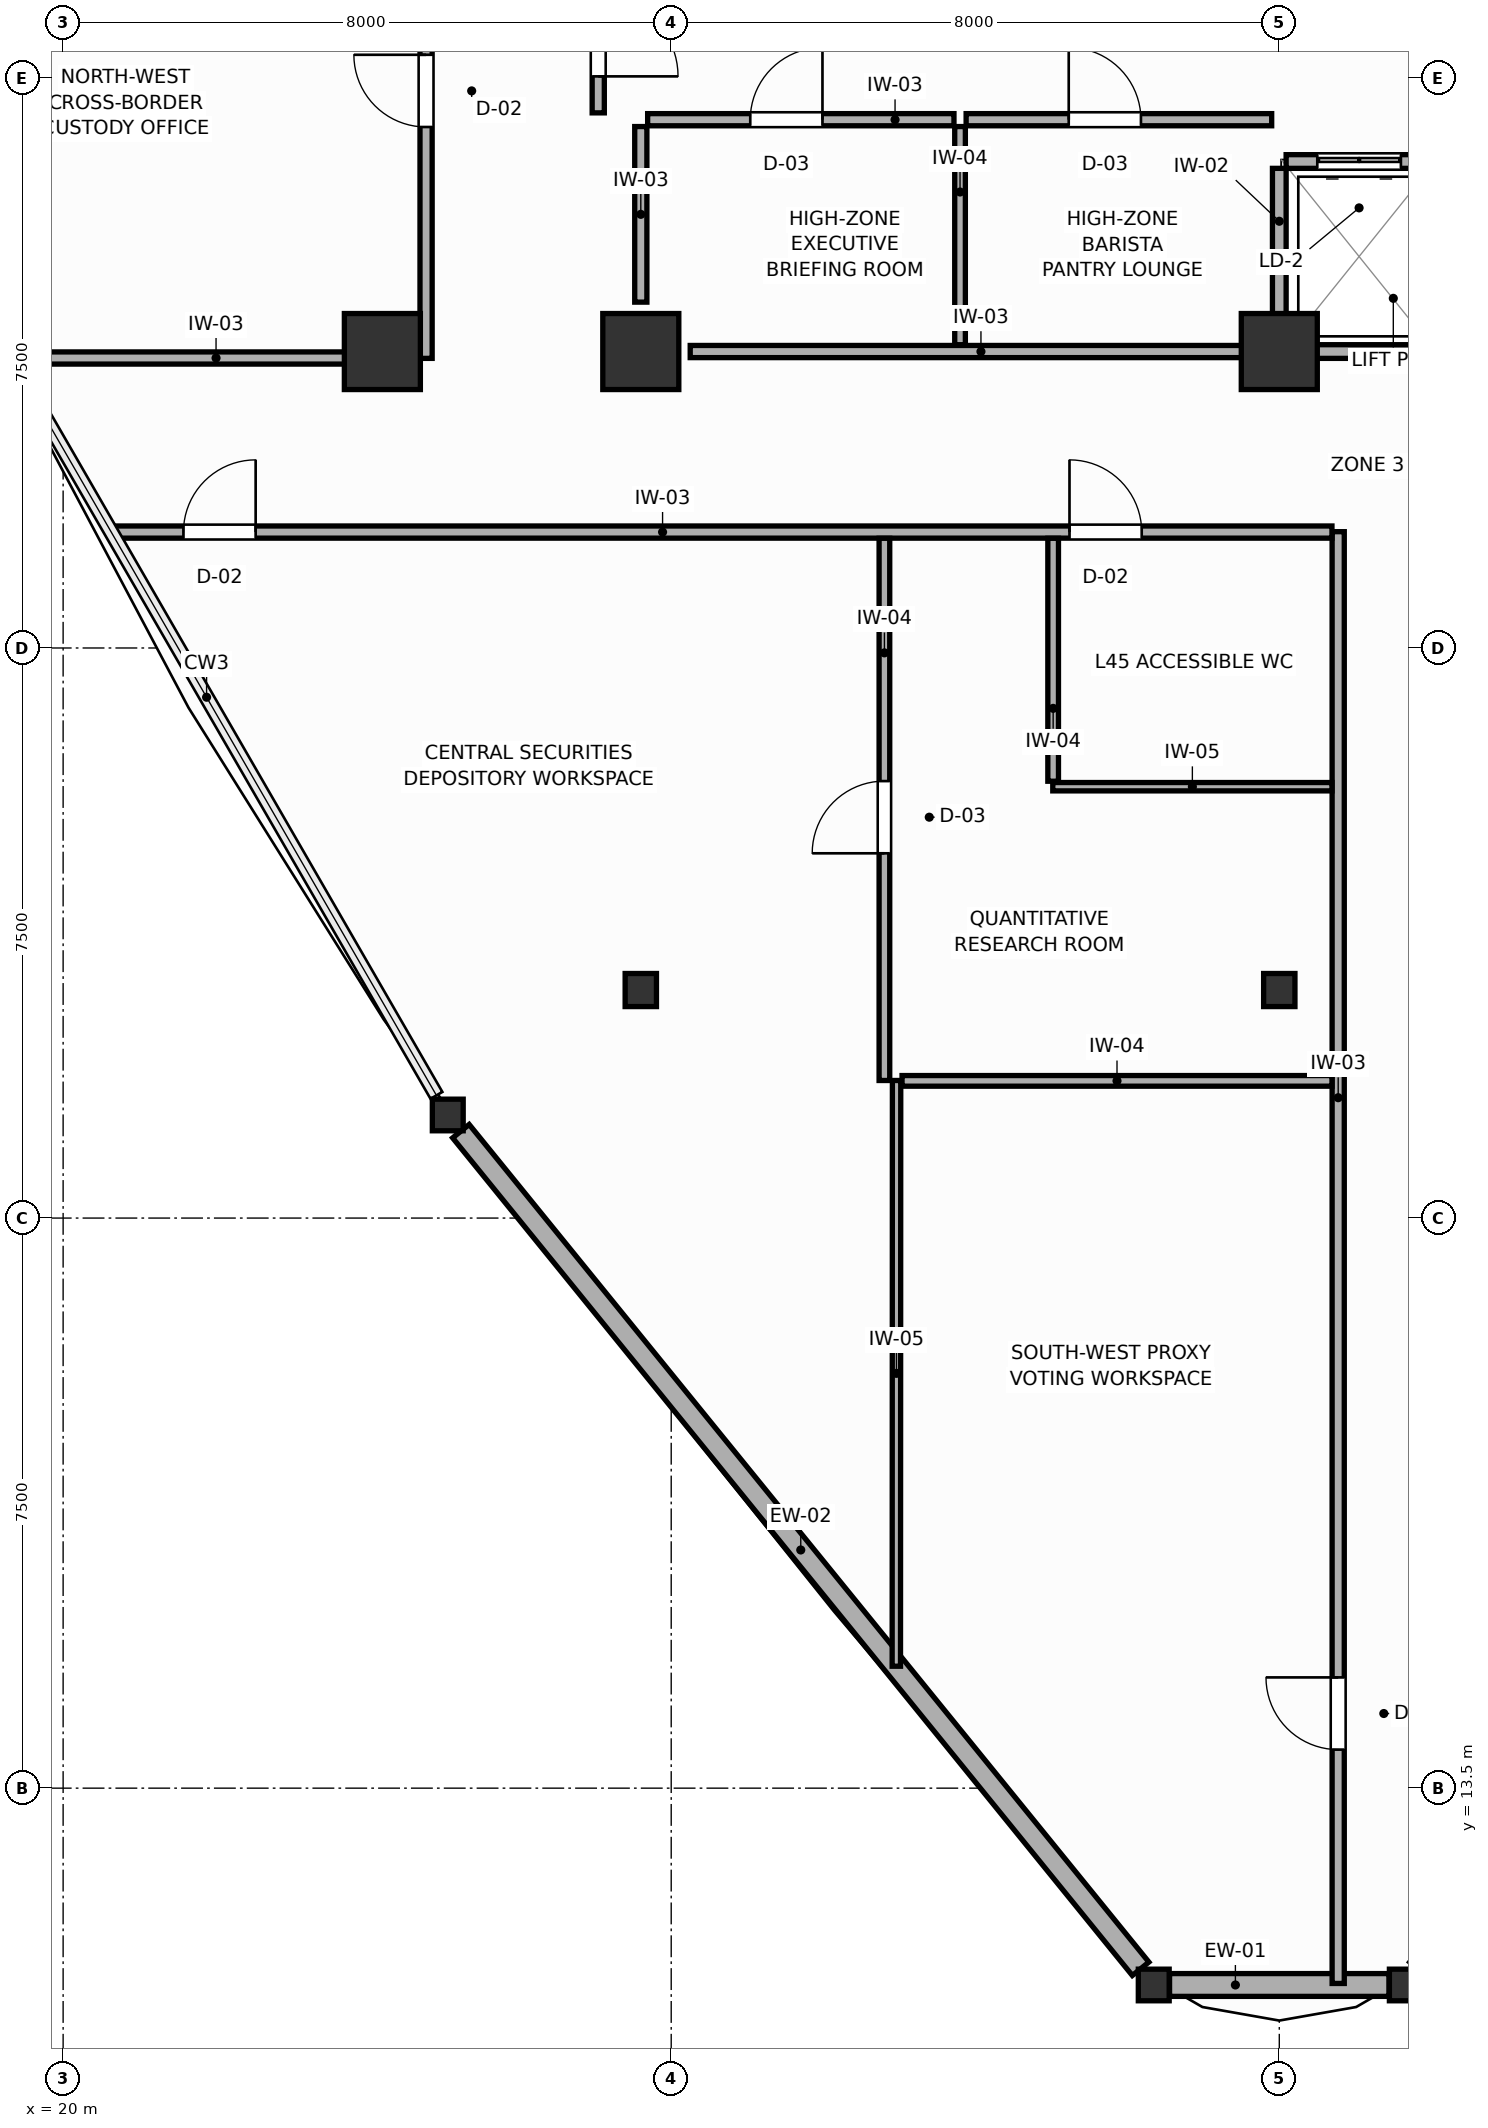
"""IFC4 building model, lengths in metres.
Left out: names, types, materials, properties, quantities, classifications, styles, units other than length and angle.
Written with IfcOpenShell. Run it as: python <this file> out.ifc"""

import sys

from ifc_helpers import new_model, si_unit, direction, frame, frame_2d, origin, origin_2d, place, context, subcontext, project, spatial, rectangle, i_section, extrude, source, transform, mapped, element, fill, save


model = new_model("IFC4")
c1 = context("Model", 3, precision=1e-05, world=origin(), true_north=direction((0.0, 1.0)))
c2 = subcontext(c1, "Body", "Model", "MODEL_VIEW")
j1 = project(units=[si_unit("LENGTHUNIT", "METRE"), si_unit("PLANEANGLEUNIT", "RADIAN")], contexts=[c1])
p1 = place(None, origin())
s1 = spatial("IfcSite", under=j1, at=p1, CompositionType="ELEMENT")
p2 = place(p1, origin())
s2 = spatial("IfcBuilding", under=s1, at=p2, CompositionType="ELEMENT")
p3 = place(p2, frame((0.0, 0.0, 175.8)))
s3 = spatial("IfcBuildingStorey", under=s2, at=p3, CompositionType="ELEMENT", Elevation=175.8)
m1 = source(origin(), c2, "Body", "SweptSolid", [
    extrude(rectangle(XDim=1.0, YDim=1.0, at=origin_2d()), origin(), (0.0, 0.0, 1.0), 3.6),
])
for number, where, z_axis, x_axis in (
    (1, (27.6, 32.4, 0.0), (0.0, 0.0, 1.0), (1.0, 0.0, 0.0)),
    (2, (36.0, 32.4, 0.0), (0.0, 0.0, 1.0), (1.0, 0.0, 0.0)),
    (3, (24.2, 32.4, 0.0), (0.0, 0.0, 1.0), (1.0, 0.0, 0.0)),
):
    element("IfcColumn", number, at=place(p3, frame(where, z_axis=z_axis, x_axis=x_axis)), inside=s3, PredefinedType="COLUMN", context=c2, shape_type="MappedRepresentation", body=[
        mapped(m1, transform((0.0, 0.0, 0.0), scale=1.0)),
    ])
m2 = source(origin(), c2, "Body", "SweptSolid", [
    extrude(i_section(OverallWidth=0.412, OverallDepth=0.435, WebThickness=0.033, FlangeThickness=0.053, FilletRadius=0.015, at=origin_2d()), origin(), (0.0, 0.0, 1.0), 3.6),
])
for number, where, z_axis, x_axis in (
    (4, (27.6, 24.0, 0.0), (0.0, 0.0, 1.0), (1.0, 0.0, 0.0)),
    (5, (36.0, 24.0, 0.0), (0.0, 0.0, 1.0), (1.0, 0.0, 0.0)),
):
    element("IfcColumn", number, at=place(p3, frame(where, z_axis=z_axis, x_axis=x_axis)), inside=s3, PredefinedType="COLUMN", context=c2, shape_type="MappedRepresentation", body=[
        mapped(m2, transform((0.0, 0.0, 0.0), scale=1.0)),
    ])
m3 = source(origin(), c2, "Body", "SweptSolid", [
    extrude(i_section(OverallWidth=0.406, OverallDepth=0.416, WebThickness=0.027, FlangeThickness=0.044, FilletRadius=0.015, at=origin_2d()), origin(), (0.0, 0.0, 1.0), 3.6),
])
for number, where, z_axis, x_axis in (
    (6, (25.06, 22.356, 0.0), (0.0, 0.0, 1.0), (1.0, 0.0, 0.0)),
    (7, (34.348, 10.911, 0.0), (0.0, 0.0, 1.0), (1.0, 0.0, 0.0)),
    (8, (37.652, 10.911, 0.0), (0.0, 0.0, 1.0), (1.0, 0.0, 0.0)),
):
    element("IfcColumn", number, at=place(p3, frame(where, z_axis=z_axis, x_axis=x_axis)), inside=s3, PredefinedType="COLUMN", context=c2, shape_type="MappedRepresentation", body=[
        mapped(m3, transform((0.0, 0.0, 0.0), scale=1.0)),
    ])
p4 = place(p3, frame((25.233, 22.143, 0.0), z_axis=(0.0, 0.0, 1.0), x_axis=(0.63011778054, -0.776499570281, 0.0)))
e9 = element("IfcWall", 9, at=p4, inside=s3, PredefinedType="SOLIDWALL", context=c2, shape_type="SweptSolid", body=[
    extrude(rectangle(XDim=14.192, YDim=0.28, at=frame_2d((7.096, 0.0))), origin(), (0.0, 0.0, 1.0), 1.87),
])
p5 = place(p3, frame((34.556, 10.911, 0.0), z_axis=(0.0, 0.0, 1.0), x_axis=(1.0, 0.0, 0.0)))
e10 = element("IfcWall", 10, at=p5, inside=s3, PredefinedType="SOLIDWALL", context=c2, shape_type="SweptSolid", body=[
    extrude(rectangle(XDim=2.887, YDim=0.3, at=frame_2d((1.444, 0.0))), origin(), (0.0, 0.0, 1.0), 1.87),
])
p6 = place(p3, frame((36.09, 34.9, 0.0), z_axis=(0.0, 0.0, 1.0), x_axis=(1.0, 0.0, 0.0)))
e11 = element("IfcWall", 11, at=p6, inside=s3, PredefinedType="PARTITIONING", context=c2, shape_type="SweptSolid", body=[
    extrude(rectangle(XDim=1.92, YDim=0.18, at=frame_2d((0.96, 0.0))), origin(), (0.0, 0.0, 1.0), 3.4),
])
p7 = place(p6, frame((0.41, 0.0, 0.0)))
e12 = element("IfcOpeningElement", 12, at=p7, cuts=e11, PredefinedType="OPENING", context=c2, shape_type="SweptSolid", body=[
    extrude(rectangle(XDim=1.1, YDim=2.1, at=frame_2d((0.55, 1.05))), frame((0.0, 0.1, 0.0), z_axis=(0.0, -1.0, 0.0), x_axis=(1.0, 0.0, 0.0)), (0.0, 0.0, 1.0), 0.2),
])
p8 = place(p3, frame((36.09, 32.4, 0.0), z_axis=(0.0, 0.0, 1.0), x_axis=(1.0, 0.0, 0.0)))
e13 = element("IfcWall", 13, at=p8, inside=s3, PredefinedType="PARTITIONING", context=c2, shape_type="SweptSolid", body=[
    extrude(rectangle(XDim=1.92, YDim=0.18, at=frame_2d((0.96, 0.0))), origin(), (0.0, 0.0, 1.0), 2.16),
])
p9 = place(p3, frame((36.0, 32.49, 0.0), z_axis=(0.0, 0.0, 1.0), x_axis=(0.0, 1.0, 0.0)))
e14 = element("IfcWall", 14, at=p9, inside=s3, PredefinedType="PARTITIONING", context=c2, shape_type="SweptSolid", body=[
    extrude(rectangle(XDim=2.32, YDim=0.18, at=frame_2d((1.16, 0.0))), origin(), (0.0, 0.0, 1.0), 3.4),
])
p10 = place(p3, frame((28.25, 32.4, 0.0), z_axis=(0.0, 0.0, 1.0), x_axis=(1.0, 0.0, 0.0)))
e15 = element("IfcWall", 15, at=p10, inside=s3, PredefinedType="PARTITIONING", context=c2, shape_type="SweptSolid", body=[
    extrude(rectangle(XDim=7.65, YDim=0.16, at=frame_2d((3.825, 0.0))), origin(), (0.0, 0.0, 1.0), 2.16),
])
p11 = place(p3, frame((27.6, 33.05, 0.0), z_axis=(0.0, 0.0, 1.0), x_axis=(0.0, 1.0, 0.0)))
e16 = element("IfcWall", 16, at=p11, inside=s3, PredefinedType="PARTITIONING", context=c2, shape_type="SweptSolid", body=[
    extrude(rectangle(XDim=2.31, YDim=0.16, at=frame_2d((1.155, 0.0))), origin(), (0.0, 0.0, 1.0), 3.4),
])
p12 = place(p3, frame((31.8, 32.49, 0.0), z_axis=(0.0, 0.0, 1.0), x_axis=(0.0, 1.0, 0.0)))
e17 = element("IfcWall", 17, at=p12, inside=s3, PredefinedType="PARTITIONING", context=c2, shape_type="SweptSolid", body=[
    extrude(rectangle(XDim=2.87, YDim=0.14, at=frame_2d((1.435, 0.0))), origin(), (0.0, 0.0, 1.0), 3.4),
])
p13 = place(p3, frame((27.69, 35.45, 0.0), z_axis=(0.0, 0.0, 1.0), x_axis=(1.0, 0.0, 0.0)))
e18 = element("IfcWall", 18, at=p13, inside=s3, PredefinedType="PARTITIONING", context=c2, shape_type="SweptSolid", body=[
    extrude(rectangle(XDim=4.03, YDim=0.16, at=frame_2d((2.015, 0.0))), origin(), (0.0, 0.0, 1.0), 3.4),
])
p14 = place(p13, frame((1.35, 0.0, 0.0)))
e19 = element("IfcOpeningElement", 19, at=p14, cuts=e18, PredefinedType="OPENING", context=c2, shape_type="SweptSolid", body=[
    extrude(rectangle(XDim=0.95, YDim=2.05, at=frame_2d((0.475, 1.025))), frame((0.0, 0.09, 0.0), z_axis=(0.0, -1.0, 0.0), x_axis=(1.0, 0.0, 0.0)), (0.0, 0.0, 1.0), 0.18),
])
p15 = place(p3, frame((31.88, 35.45, 0.0), z_axis=(0.0, 0.0, 1.0), x_axis=(1.0, 0.0, 0.0)))
e20 = element("IfcWall", 20, at=p15, inside=s3, PredefinedType="PARTITIONING", context=c2, shape_type="SweptSolid", body=[
    extrude(rectangle(XDim=4.02, YDim=0.16, at=frame_2d((2.01, 0.0))), origin(), (0.0, 0.0, 1.0), 3.4),
])
p16 = place(p15, frame((1.35, 0.0, 0.0)))
e21 = element("IfcOpeningElement", 21, at=p16, cuts=e20, PredefinedType="OPENING", context=c2, shape_type="SweptSolid", body=[
    extrude(rectangle(XDim=0.95, YDim=2.05, at=frame_2d((0.475, 1.025))), frame((0.0, 0.09, 0.0), z_axis=(0.0, -1.0, 0.0), x_axis=(1.0, 0.0, 0.0)), (0.0, 0.0, 1.0), 0.18),
])
p17 = place(p3, frame((27.04, 35.54, 0.0), z_axis=(0.0, 0.0, 1.0), x_axis=(0.0, 1.0, 0.0)))
e22 = element("IfcWall", 22, at=p17, inside=s3, PredefinedType="PARTITIONING", context=c2, shape_type="SweptSolid", body=[
    extrude(rectangle(XDim=2.11, YDim=0.16, at=frame_2d((1.055, 0.0))), origin(), (0.0, 0.0, 1.0), 3.4),
])
p18 = place(p17, frame((0.48, 0.0, 0.0)))
e23 = element("IfcOpeningElement", 23, at=p18, cuts=e22, PredefinedType="OPENING", context=c2, shape_type="SweptSolid", body=[
    extrude(rectangle(XDim=1.05, YDim=2.1, at=frame_2d((0.525, 1.05))), frame((0.0, 0.09, 0.0), z_axis=(0.0, -1.0, 0.0), x_axis=(1.0, 0.0, 0.0)), (0.0, 0.0, 1.0), 0.18),
])
p19 = place(p3, frame((24.775, 32.31, 0.0), z_axis=(0.0, 0.0, 1.0), x_axis=(0.0, 1.0, 0.0)))
e24 = element("IfcWall", 24, at=p19, inside=s3, PredefinedType="PARTITIONING", context=c2, shape_type="SweptSolid", body=[
    extrude(rectangle(XDim=19.188, YDim=0.16, at=frame_2d((9.594, 0.0))), origin(), (0.0, 0.0, 1.0), 3.4),
])
p20 = place(p19, frame((3.044, 0.0, 0.0)))
e25 = element("IfcOpeningElement", 25, at=p20, cuts=e24, PredefinedType="OPENING", context=c2, shape_type="SweptSolid", body=[
    extrude(rectangle(XDim=0.95, YDim=2.05, at=frame_2d((0.475, 1.025))), frame((0.0, 0.09, 0.0), z_axis=(0.0, -1.0, 0.0), x_axis=(1.0, 0.0, 0.0)), (0.0, 0.0, 1.0), 0.18),
])
p21 = place(p19, frame((11.463, 0.0, 0.0)))
e26 = element("IfcOpeningElement", 26, at=p21, cuts=e24, PredefinedType="OPENING", context=c2, shape_type="SweptSolid", body=[
    extrude(rectangle(XDim=0.95, YDim=2.05, at=frame_2d((0.475, 1.025))), frame((0.0, 0.09, 0.0), z_axis=(0.0, -1.0, 0.0), x_axis=(1.0, 0.0, 0.0)), (0.0, 0.0, 1.0), 0.18),
])
p22 = place(p3, frame((36.775, 10.931, 0.0), z_axis=(0.0, 0.0, 1.0), x_axis=(0.0, 1.0, 0.0)))
e27 = element("IfcWall", 27, at=p22, inside=s3, PredefinedType="PARTITIONING", context=c2, shape_type="SweptSolid", body=[
    extrude(rectangle(XDim=19.099, YDim=0.16, at=frame_2d((9.55, 0.0))), origin(), (0.0, 0.0, 1.0), 3.4),
])
p23 = place(p22, frame((3.076, 0.0, 0.0)))
e28 = element("IfcOpeningElement", 28, at=p23, cuts=e27, PredefinedType="OPENING", context=c2, shape_type="SweptSolid", body=[
    extrude(rectangle(XDim=0.95, YDim=2.05, at=frame_2d((0.475, 1.025))), frame((0.0, 0.09, 0.0), z_axis=(0.0, -1.0, 0.0), x_axis=(1.0, 0.0, 0.0)), (0.0, 0.0, 1.0), 0.18),
])
p24 = place(p3, frame((20.653, 30.025, 0.0), z_axis=(0.0, 0.0, 1.0), x_axis=(1.0, 0.0, 0.0)))
e29 = element("IfcWall", 29, at=p24, inside=s3, PredefinedType="PARTITIONING", context=c2, shape_type="SweptSolid", body=[
    extrude(rectangle(XDim=16.04, YDim=0.16, at=frame_2d((8.02, 0.0))), origin(), (0.0, 0.0, 1.0), 3.4),
])
p25 = place(p24, frame((12.587, 0.0, 0.0)))
e30 = element("IfcOpeningElement", 30, at=p25, cuts=e29, PredefinedType="OPENING", context=c2, shape_type="SweptSolid", body=[
    extrude(rectangle(XDim=0.95, YDim=2.05, at=frame_2d((0.475, 1.025))), frame((0.0, 0.09, 0.0), z_axis=(0.0, -1.0, 0.0), x_axis=(1.0, 0.0, 0.0)), (0.0, 0.0, 1.0), 0.18),
])
p26 = place(p24, frame((0.93, 0.0, 0.0)))
e31 = element("IfcOpeningElement", 31, at=p26, cuts=e29, PredefinedType="OPENING", context=c2, shape_type="SweptSolid", body=[
    extrude(rectangle(XDim=0.95, YDim=2.05, at=frame_2d((0.475, 1.025))), frame((0.0, 0.09, 0.0), z_axis=(0.0, -1.0, 0.0), x_axis=(1.0, 0.0, 0.0)), (0.0, 0.0, 1.0), 0.18),
])
p27 = place(p3, frame((19.331, 32.315, 0.0), z_axis=(0.0, 0.0, 1.0), x_axis=(1.0, 0.0, 0.0)))
e32 = element("IfcWall", 32, at=p27, inside=s3, PredefinedType="PARTITIONING", context=c2, shape_type="SweptSolid", body=[
    extrude(rectangle(XDim=5.362, YDim=0.16, at=frame_2d((2.681, 0.0))), origin(), (0.0, 0.0, 1.0), 2.16),
])
p28 = place(p3, frame((30.962, 15.104, 0.0), z_axis=(0.0, 0.0, 1.0), x_axis=(0.000443543234, 0.999999901635, 0.0)))
e33 = element("IfcWall", 33, at=p28, inside=s3, PredefinedType="MOVABLE", context=c2, shape_type="SweptSolid", body=[
    extrude(rectangle(XDim=7.706, YDim=0.11, at=frame_2d((3.853, 0.0))), origin(), (0.0, 0.0, 1.0), 3.4),
])
p29 = place(p3, frame((30.805, 22.81, 0.0), z_axis=(0.0, 0.0, 1.0), x_axis=(0.0, 1.0, 0.0)))
e34 = element("IfcWall", 34, at=p29, inside=s3, PredefinedType="PARTITIONING", context=c2, shape_type="SweptSolid", body=[
    extrude(rectangle(XDim=7.133, YDim=0.14, at=frame_2d((3.566, 0.0))), origin(), (0.0, 0.0, 1.0), 3.4),
])
p30 = place(p29, frame((2.989, 0.0, 0.0)))
e35 = element("IfcOpeningElement", 35, at=p30, cuts=e34, PredefinedType="OPENING", context=c2, shape_type="SweptSolid", body=[
    extrude(rectangle(XDim=0.95, YDim=2.05, at=frame_2d((0.475, 1.025))), frame((0.0, 0.08, 0.0), z_axis=(0.0, -1.0, 0.0), x_axis=(1.0, 0.0, 0.0)), (0.0, 0.0, 1.0), 0.16),
])
p31 = place(p3, frame((31.037, 22.805, 0.0), z_axis=(0.0, 0.0, 1.0), x_axis=(1.0, 0.0, 0.0)))
e36 = element("IfcWall", 36, at=p31, inside=s3, PredefinedType="PARTITIONING", context=c2, shape_type="SweptSolid", body=[
    extrude(rectangle(XDim=5.656, YDim=0.14, at=frame_2d((2.828, 0.0))), origin(), (0.0, 0.0, 1.0), 3.4),
])
p32 = place(p3, frame((33.02, 26.675, 0.0), z_axis=(0.0, 0.0, 1.0), x_axis=(1.0, 0.0, 0.0)))
e37 = element("IfcWall", 37, at=p32, inside=s3, PredefinedType="MOVABLE", context=c2, shape_type="SweptSolid", body=[
    extrude(rectangle(XDim=3.673, YDim=0.11, at=frame_2d((1.836, 0.0))), origin(), (0.0, 0.0, 1.0), 3.4),
])
p33 = place(p3, frame((33.025, 26.747, 0.0), z_axis=(0.0, 0.0, 1.0), x_axis=(0.0, 1.0, 0.0)))
e38 = element("IfcWall", 38, at=p33, inside=s3, PredefinedType="PARTITIONING", context=c2, shape_type="SweptSolid", body=[
    extrude(rectangle(XDim=3.196, YDim=0.14, at=frame_2d((1.598, 0.0))), origin(), (0.0, 0.0, 1.0), 3.4),
])
p34 = place(p7, origin())
e39 = element("IfcDoor", 39, at=p34, inside=s3, OperationType="DOUBLE_DOOR_SLIDING", PredefinedType="DOOR", context=c2, shape_type="SweptSolid", body=[
    extrude(rectangle(XDim=1.1, YDim=2.1, at=frame_2d((0.55, 1.05))), frame((0.0, 0.025, 0.0), z_axis=(0.0, -1.0, 0.0), x_axis=(1.0, 0.0, 0.0)), (0.0, 0.0, 1.0), 0.05),
])
fill(e12, e39)
p35 = place(p14, origin())
e40 = element("IfcDoor", 40, at=p35, inside=s3, OperationType="SINGLE_SWING_RIGHT", PredefinedType="DOOR", context=c2, shape_type="SweptSolid", body=[
    extrude(rectangle(XDim=0.95, YDim=2.05, at=frame_2d((0.475, 1.025))), frame((0.0, 0.025, 0.0), z_axis=(0.0, -1.0, 0.0), x_axis=(1.0, 0.0, 0.0)), (0.0, 0.0, 1.0), 0.05),
])
fill(e19, e40)
p36 = place(p16, origin())
e41 = element("IfcDoor", 41, at=p36, inside=s3, OperationType="SINGLE_SWING_LEFT", PredefinedType="DOOR", context=c2, shape_type="SweptSolid", body=[
    extrude(rectangle(XDim=0.95, YDim=2.05, at=frame_2d((0.475, 1.025))), frame((0.0, 0.025, 0.0), z_axis=(0.0, -1.0, 0.0), x_axis=(1.0, 0.0, 0.0)), (0.0, 0.0, 1.0), 0.05),
])
fill(e21, e41)
p37 = place(p18, frame((1.05, 0.0, 0.0), z_axis=(0.0, 0.0, 1.0), x_axis=(-1.0, 0.0, 0.0)))
e42 = element("IfcDoor", 42, at=p37, inside=s3, OperationType="SINGLE_SWING_RIGHT", PredefinedType="DOOR", context=c2, shape_type="SweptSolid", body=[
    extrude(rectangle(XDim=1.05, YDim=2.1, at=frame_2d((0.525, 1.05))), frame((0.0, 0.025, 0.0), z_axis=(0.0, -1.0, 0.0), x_axis=(1.0, 0.0, 0.0)), (0.0, 0.0, 1.0), 0.05),
])
fill(e23, e42)
p38 = place(p20, origin())
e43 = element("IfcDoor", 43, at=p38, inside=s3, OperationType="SINGLE_SWING_RIGHT", PredefinedType="DOOR", context=c2, shape_type="SweptSolid", body=[
    extrude(rectangle(XDim=0.95, YDim=2.05, at=frame_2d((0.475, 1.025))), frame((0.0, 0.025, 0.0), z_axis=(0.0, -1.0, 0.0), x_axis=(1.0, 0.0, 0.0)), (0.0, 0.0, 1.0), 0.05),
])
fill(e25, e43)
p39 = place(p23, origin())
e44 = element("IfcDoor", 44, at=p39, inside=s3, OperationType="SINGLE_SWING_RIGHT", PredefinedType="DOOR", context=c2, shape_type="SweptSolid", body=[
    extrude(rectangle(XDim=0.95, YDim=2.05, at=frame_2d((0.475, 1.025))), frame((0.0, 0.025, 0.0), z_axis=(0.0, -1.0, 0.0), x_axis=(1.0, 0.0, 0.0)), (0.0, 0.0, 1.0), 0.05),
])
fill(e28, e44)
p40 = place(p25, origin())
e45 = element("IfcDoor", 45, at=p40, inside=s3, OperationType="SINGLE_SWING_LEFT", PredefinedType="DOOR", context=c2, shape_type="SweptSolid", body=[
    extrude(rectangle(XDim=0.95, YDim=2.05, at=frame_2d((0.475, 1.025))), frame((0.0, 0.025, 0.0), z_axis=(0.0, -1.0, 0.0), x_axis=(1.0, 0.0, 0.0)), (0.0, 0.0, 1.0), 0.05),
])
fill(e30, e45)
p41 = place(p26, origin())
e46 = element("IfcDoor", 46, at=p41, inside=s3, OperationType="SINGLE_SWING_RIGHT", PredefinedType="DOOR", context=c2, shape_type="SweptSolid", body=[
    extrude(rectangle(XDim=0.95, YDim=2.05, at=frame_2d((0.475, 1.025))), frame((0.0, 0.025, 0.0), z_axis=(0.0, -1.0, 0.0), x_axis=(1.0, 0.0, 0.0)), (0.0, 0.0, 1.0), 0.05),
])
fill(e31, e46)
p42 = place(p30, origin())
e47 = element("IfcDoor", 47, at=p42, inside=s3, OperationType="SINGLE_SWING_LEFT", PredefinedType="DOOR", context=c2, shape_type="SweptSolid", body=[
    extrude(rectangle(XDim=0.95, YDim=2.05, at=frame_2d((0.475, 1.025))), frame((0.0, 0.025, 0.0), z_axis=(0.0, -1.0, 0.0), x_axis=(1.0, 0.0, 0.0)), (0.0, 0.0, 1.0), 0.05),
])
fill(e35, e47)
save(model, sys.argv[1])
